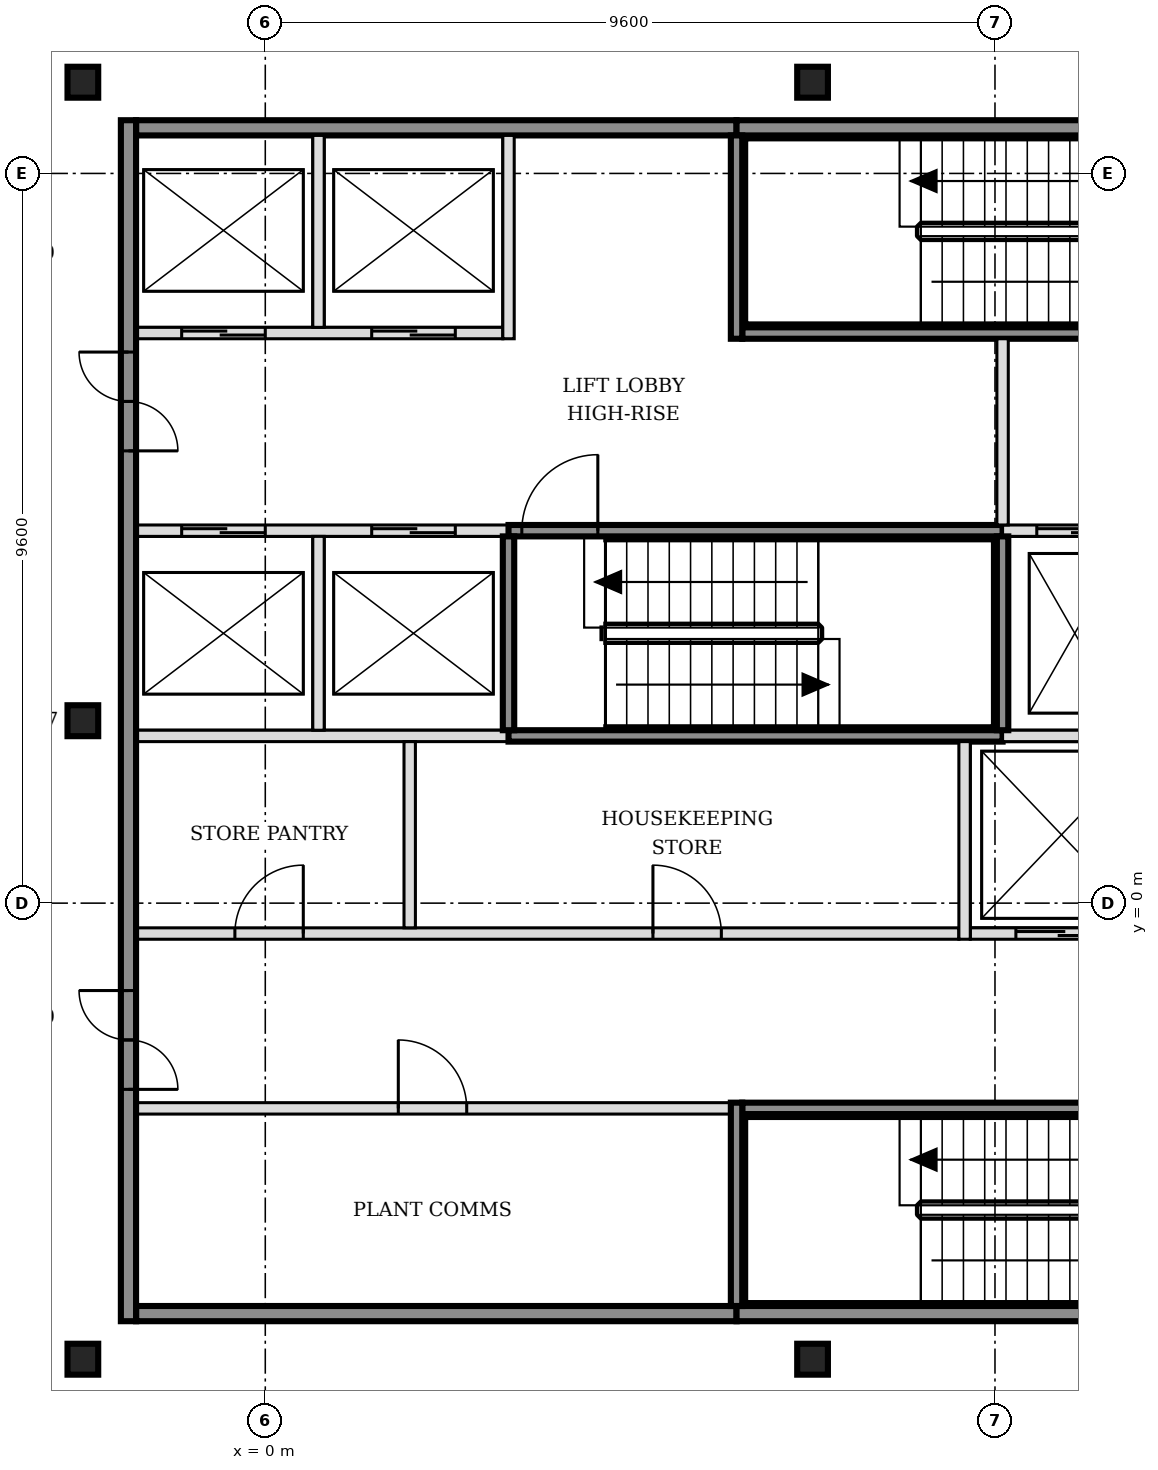
"""IFC4 building model, lengths in metres.
Left out: names, types, materials, properties, quantities, classifications, styles, units other than length and angle.
Written with IfcOpenShell. Run it as: python <this file> out.ifc"""

import sys

from ifc_helpers import new_model, si_unit, direction, frame, frame_2d, origin, origin_2d, place, context, subcontext, project, spatial, rectangle, i_section, extrude, element, fill, save


model = new_model("IFC4")
c1 = context("Model", 3, precision=1e-05, world=origin(), true_north=direction((0.0, 1.0)))
c2 = subcontext(c1, "Body", "Model", "MODEL_VIEW")
j1 = project(units=[si_unit("LENGTHUNIT", "METRE"), si_unit("PLANEANGLEUNIT", "RADIAN")], contexts=[c1])
p1 = place(None, origin())
s1 = spatial("IfcSite", under=j1, at=p1, CompositionType="ELEMENT")
p2 = place(p1, origin())
s2 = spatial("IfcBuilding", under=s1, at=p2, CompositionType="ELEMENT")
p3 = place(p2, frame((0.0, 0.0, 197.4)))
s3 = spatial("IfcBuildingStorey", under=s2, at=p3, CompositionType="ELEMENT", Elevation=197.4)
for number, where, z_axis, x_axis in (
    (1, (-2.4, -6.0, -0.15), (0.0, 0.0, 1.0), (1.0, 0.0, 0.0)),
    (2, (7.2, -6.0, -0.15), (0.0, 0.0, 1.0), (1.0, 0.0, 0.0)),
    (3, (-2.4, 2.4, -0.15), (0.0, 0.0, 1.0), (1.0, 0.0, 0.0)),
    (4, (-2.4, 10.8, -0.15), (0.0, 0.0, 1.0), (1.0, 0.0, 0.0)),
    (5, (7.2, 10.8, -0.15), (0.0, 0.0, 1.0), (1.0, 0.0, 0.0)),
):
    element("IfcColumn", number, at=place(p3, frame(where, z_axis=z_axis, x_axis=x_axis)), inside=s3, PredefinedType="COLUMN", context=c2, shape_type="SweptSolid", body=[
        extrude(i_section(OverallWidth=0.404, OverallDepth=0.407, WebThickness=0.027, FlangeThickness=0.044, FilletRadius=0.015, at=origin_2d()), origin(), (0.0, 0.0, 1.0), 3.6),
    ])
p4 = place(p3, frame((-1.7, -5.4, 0.0), z_axis=(0.0, 0.0, 1.0), x_axis=(1.0, 0.0, 0.0)))
e6 = element("IfcWall", 6, at=p4, inside=s3, PredefinedType="SOLIDWALL", context=c2, shape_type="SweptSolid", body=[
    extrude(rectangle(XDim=7.9, YDim=0.2, at=frame_2d((3.95, 0.0))), origin(), (0.0, 0.0, 1.0), 3.45),
])
p5 = place(p3, frame((6.2, -5.4, 0.0), z_axis=(0.0, 0.0, 1.0), x_axis=(1.0, 0.0, 0.0)))
e7 = element("IfcWall", 7, at=p5, inside=s3, PredefinedType="SOLIDWALL", context=c2, shape_type="SweptSolid", body=[
    extrude(rectangle(XDim=6.5, YDim=0.2, at=frame_2d((3.25, 0.0))), origin(), (0.0, 0.0, 1.0), 3.45),
])
p6 = place(p3, frame((-1.7, -2.7, 0.0), z_axis=(0.0, 0.0, 1.0), x_axis=(1.0, 0.0, 0.0)))
e8 = element("IfcWall", 8, at=p6, inside=s3, PredefinedType="PARTITIONING", context=c2, shape_type="SweptSolid", body=[
    extrude(rectangle(XDim=7.825, YDim=0.15, at=frame_2d((3.913, 0.0))), origin(), (0.0, 0.0, 1.0), 3.45),
])
p7 = place(p6, frame((3.45, 0.0, 0.0)))
e9 = element("IfcOpeningElement", 9, at=p7, cuts=e8, PredefinedType="OPENING", context=c2, shape_type="SweptSolid", body=[
    extrude(rectangle(XDim=0.9, YDim=2.1, at=frame_2d((0.45, 1.05))), frame((0.0, 0.085, 0.0), z_axis=(0.0, -1.0, 0.0), x_axis=(1.0, 0.0, 0.0)), (0.0, 0.0, 1.0), 0.17),
])
p8 = place(p3, frame((6.275, -2.7, 0.0), z_axis=(0.0, 0.0, 1.0), x_axis=(1.0, 0.0, 0.0)))
e10 = element("IfcWall", 10, at=p8, inside=s3, PredefinedType="SOLIDWALL", context=c2, shape_type="SweptSolid", body=[
    extrude(rectangle(XDim=6.35, YDim=0.15, at=frame_2d((3.175, 0.0))), origin(), (0.0, 0.0, 1.0), 3.45),
])
p9 = place(p8, frame((5.225, 0.0, 0.0)))
e11 = element("IfcOpeningElement", 11, at=p9, cuts=e10, PredefinedType="OPENING", context=c2, shape_type="SweptSolid", body=[
    extrude(rectangle(XDim=1.0, YDim=2.1, at=frame_2d((0.5, 1.05))), frame((0.0, 0.085, 0.0), z_axis=(0.0, -1.0, 0.0), x_axis=(1.0, 0.0, 0.0)), (0.0, 0.0, 1.0), 0.17),
])
p10 = place(p3, frame((-1.7, -0.4, 0.0), z_axis=(0.0, 0.0, 1.0), x_axis=(1.0, 0.0, 0.0)))
e12 = element("IfcWall", 12, at=p10, inside=s3, PredefinedType="PARTITIONING", context=c2, shape_type="SweptSolid", body=[
    extrude(rectangle(XDim=10.825, YDim=0.15, at=frame_2d((5.413, 0.0))), origin(), (0.0, 0.0, 1.0), 3.45),
])
p11 = place(p10, frame((1.3, 0.0, 0.0)))
e13 = element("IfcOpeningElement", 13, at=p11, cuts=e12, PredefinedType="OPENING", context=c2, shape_type="SweptSolid", body=[
    extrude(rectangle(XDim=0.9, YDim=2.1, at=frame_2d((0.45, 1.05))), frame((0.0, 0.085, 0.0), z_axis=(0.0, -1.0, 0.0), x_axis=(1.0, 0.0, 0.0)), (0.0, 0.0, 1.0), 0.17),
])
p12 = place(p10, frame((6.8, 0.0, 0.0)))
e14 = element("IfcOpeningElement", 14, at=p12, cuts=e12, PredefinedType="OPENING", context=c2, shape_type="SweptSolid", body=[
    extrude(rectangle(XDim=0.9, YDim=2.1, at=frame_2d((0.45, 1.05))), frame((0.0, 0.085, 0.0), z_axis=(0.0, -1.0, 0.0), x_axis=(1.0, 0.0, 0.0)), (0.0, 0.0, 1.0), 0.17),
])
p13 = place(p3, frame((9.275, -0.4, 0.0), z_axis=(0.0, 0.0, 1.0), x_axis=(1.0, 0.0, 0.0)))
e15 = element("IfcWall", 15, at=p13, inside=s3, PredefinedType="SOLIDWALL", context=c2, shape_type="SweptSolid", body=[
    extrude(rectangle(XDim=4.95, YDim=0.15, at=frame_2d((2.475, 0.0))), origin(), (0.0, 0.0, 1.0), 3.45),
])
p14 = place(p13, frame((0.6, 0.0, 0.0)))
e16 = element("IfcOpeningElement", 16, at=p14, cuts=e15, PredefinedType="OPENING", context=c2, shape_type="SweptSolid", body=[
    extrude(rectangle(XDim=1.2, YDim=2.1, at=frame_2d((0.6, 1.05))), frame((0.0, 0.085, 0.0), z_axis=(0.0, -1.0, 0.0), x_axis=(1.0, 0.0, 0.0)), (0.0, 0.0, 1.0), 0.17),
])
p15 = place(p13, frame((3.15, 0.0, 0.0)))
e17 = element("IfcOpeningElement", 17, at=p15, cuts=e15, PredefinedType="OPENING", context=c2, shape_type="SweptSolid", body=[
    extrude(rectangle(XDim=1.2, YDim=2.1, at=frame_2d((0.6, 1.05))), frame((0.0, 0.085, 0.0), z_axis=(0.0, -1.0, 0.0), x_axis=(1.0, 0.0, 0.0)), (0.0, 0.0, 1.0), 0.17),
])
p16 = place(p3, frame((-1.7, 2.2, 0.0), z_axis=(0.0, 0.0, 1.0), x_axis=(1.0, 0.0, 0.0)))
e18 = element("IfcWall", 18, at=p16, inside=s3, PredefinedType="SOLIDWALL", context=c2, shape_type="SweptSolid", body=[
    extrude(rectangle(XDim=4.9, YDim=0.15, at=frame_2d((2.45, 0.0))), origin(), (0.0, 0.0, 1.0), 3.45),
])
p17 = place(p3, frame((3.2, 2.2, 0.0), z_axis=(0.0, 0.0, 1.0), x_axis=(1.0, 0.0, 0.0)))
e19 = element("IfcWall", 19, at=p17, inside=s3, PredefinedType="SOLIDWALL", context=c2, shape_type="SweptSolid", body=[
    extrude(rectangle(XDim=6.5, YDim=0.15, at=frame_2d((3.25, 0.0))), origin(), (0.0, 0.0, 1.0), 3.45),
])
p18 = place(p3, frame((9.7, 2.2, 0.0), z_axis=(0.0, 0.0, 1.0), x_axis=(1.0, 0.0, 0.0)))
e20 = element("IfcWall", 20, at=p18, inside=s3, PredefinedType="SOLIDWALL", context=c2, shape_type="SweptSolid", body=[
    extrude(rectangle(XDim=4.525, YDim=0.15, at=frame_2d((2.263, 0.0))), origin(), (0.0, 0.0, 1.0), 3.45),
])
p19 = place(p3, frame((-1.7, 4.9, 0.0), z_axis=(0.0, 0.0, 1.0), x_axis=(1.0, 0.0, 0.0)))
e21 = element("IfcWall", 21, at=p19, inside=s3, PredefinedType="SOLIDWALL", context=c2, shape_type="SweptSolid", body=[
    extrude(rectangle(XDim=4.9, YDim=0.15, at=frame_2d((2.45, 0.0))), origin(), (0.0, 0.0, 1.0), 3.45),
])
p20 = place(p19, frame((0.6, 0.0, 0.0)))
e22 = element("IfcOpeningElement", 22, at=p20, cuts=e21, PredefinedType="OPENING", context=c2, shape_type="SweptSolid", body=[
    extrude(rectangle(XDim=1.1, YDim=2.1, at=frame_2d((0.55, 1.05))), frame((0.0, 0.085, 0.0), z_axis=(0.0, -1.0, 0.0), x_axis=(1.0, 0.0, 0.0)), (0.0, 0.0, 1.0), 0.17),
])
p21 = place(p19, frame((3.1, 0.0, 0.0)))
e23 = element("IfcOpeningElement", 23, at=p21, cuts=e21, PredefinedType="OPENING", context=c2, shape_type="SweptSolid", body=[
    extrude(rectangle(XDim=1.1, YDim=2.1, at=frame_2d((0.55, 1.05))), frame((0.0, 0.085, 0.0), z_axis=(0.0, -1.0, 0.0), x_axis=(1.0, 0.0, 0.0)), (0.0, 0.0, 1.0), 0.17),
])
p22 = place(p3, frame((3.2, 4.9, 0.0), z_axis=(0.0, 0.0, 1.0), x_axis=(1.0, 0.0, 0.0)))
e24 = element("IfcWall", 24, at=p22, inside=s3, PredefinedType="SOLIDWALL", context=c2, shape_type="SweptSolid", body=[
    extrude(rectangle(XDim=6.5, YDim=0.15, at=frame_2d((3.25, 0.0))), origin(), (0.0, 0.0, 1.0), 3.45),
])
p23 = place(p22, frame((0.175, 0.0, 0.0)))
e25 = element("IfcOpeningElement", 25, at=p23, cuts=e24, PredefinedType="OPENING", context=c2, shape_type="SweptSolid", body=[
    extrude(rectangle(XDim=1.0, YDim=2.1, at=frame_2d((0.5, 1.05))), frame((0.0, 0.085, 0.0), z_axis=(0.0, -1.0, 0.0), x_axis=(1.0, 0.0, 0.0)), (0.0, 0.0, 1.0), 0.17),
])
p24 = place(p3, frame((9.7, 4.9, 0.0), z_axis=(0.0, 0.0, 1.0), x_axis=(1.0, 0.0, 0.0)))
e26 = element("IfcWall", 26, at=p24, inside=s3, PredefinedType="SOLIDWALL", context=c2, shape_type="SweptSolid", body=[
    extrude(rectangle(XDim=6.4, YDim=0.15, at=frame_2d((3.2, 0.0))), origin(), (0.0, 0.0, 1.0), 3.45),
])
p25 = place(p24, frame((0.45, 0.0, 0.0)))
e27 = element("IfcOpeningElement", 27, at=p25, cuts=e26, PredefinedType="OPENING", context=c2, shape_type="SweptSolid", body=[
    extrude(rectangle(XDim=1.0, YDim=2.1, at=frame_2d((0.5, 1.05))), frame((0.0, 0.085, 0.0), z_axis=(0.0, -1.0, 0.0), x_axis=(1.0, 0.0, 0.0)), (0.0, 0.0, 1.0), 0.17),
])
p26 = place(p24, frame((2.35, 0.0, 0.0)))
e28 = element("IfcOpeningElement", 28, at=p26, cuts=e26, PredefinedType="OPENING", context=c2, shape_type="SweptSolid", body=[
    extrude(rectangle(XDim=1.0, YDim=2.1, at=frame_2d((0.5, 1.05))), frame((0.0, 0.085, 0.0), z_axis=(0.0, -1.0, 0.0), x_axis=(1.0, 0.0, 0.0)), (0.0, 0.0, 1.0), 0.17),
])
p27 = place(p24, frame((4.7, 0.0, 0.0)))
e29 = element("IfcOpeningElement", 29, at=p27, cuts=e26, PredefinedType="OPENING", context=c2, shape_type="SweptSolid", body=[
    extrude(rectangle(XDim=0.9, YDim=2.1, at=frame_2d((0.45, 1.05))), frame((0.0, 0.085, 0.0), z_axis=(0.0, -1.0, 0.0), x_axis=(1.0, 0.0, 0.0)), (0.0, 0.0, 1.0), 0.17),
])
p28 = place(p3, frame((-1.7, 7.5, 0.0), z_axis=(0.0, 0.0, 1.0), x_axis=(1.0, 0.0, 0.0)))
e30 = element("IfcWall", 30, at=p28, inside=s3, PredefinedType="SOLIDWALL", context=c2, shape_type="SweptSolid", body=[
    extrude(rectangle(XDim=4.825, YDim=0.15, at=frame_2d((2.413, 0.0))), origin(), (0.0, 0.0, 1.0), 3.45),
])
p29 = place(p28, frame((0.6, 0.0, 0.0)))
e31 = element("IfcOpeningElement", 31, at=p29, cuts=e30, PredefinedType="OPENING", context=c2, shape_type="SweptSolid", body=[
    extrude(rectangle(XDim=1.1, YDim=2.1, at=frame_2d((0.55, 1.05))), frame((0.0, 0.085, 0.0), z_axis=(0.0, -1.0, 0.0), x_axis=(1.0, 0.0, 0.0)), (0.0, 0.0, 1.0), 0.17),
])
p30 = place(p28, frame((3.1, 0.0, 0.0)))
e32 = element("IfcOpeningElement", 32, at=p30, cuts=e30, PredefinedType="OPENING", context=c2, shape_type="SweptSolid", body=[
    extrude(rectangle(XDim=1.1, YDim=2.1, at=frame_2d((0.55, 1.05))), frame((0.0, 0.085, 0.0), z_axis=(0.0, -1.0, 0.0), x_axis=(1.0, 0.0, 0.0)), (0.0, 0.0, 1.0), 0.17),
])
p31 = place(p3, frame((6.275, 7.5, 0.0), z_axis=(0.0, 0.0, 1.0), x_axis=(1.0, 0.0, 0.0)))
e33 = element("IfcWall", 33, at=p31, inside=s3, PredefinedType="SOLIDWALL", context=c2, shape_type="SweptSolid", body=[
    extrude(rectangle(XDim=6.425, YDim=0.15, at=frame_2d((3.212, 0.0))), origin(), (0.0, 0.0, 1.0), 3.45),
])
p32 = place(p31, frame((5.225, 0.0, 0.0)))
e34 = element("IfcOpeningElement", 34, at=p32, cuts=e33, PredefinedType="OPENING", context=c2, shape_type="SweptSolid", body=[
    extrude(rectangle(XDim=1.0, YDim=2.1, at=frame_2d((0.5, 1.05))), frame((0.0, 0.085, 0.0), z_axis=(0.0, -1.0, 0.0), x_axis=(1.0, 0.0, 0.0)), (0.0, 0.0, 1.0), 0.17),
])
p33 = place(p3, frame((-1.7, 10.2, 0.0), z_axis=(0.0, 0.0, 1.0), x_axis=(1.0, 0.0, 0.0)))
e35 = element("IfcWall", 35, at=p33, inside=s3, PredefinedType="SOLIDWALL", context=c2, shape_type="SweptSolid", body=[
    extrude(rectangle(XDim=7.9, YDim=0.2, at=frame_2d((3.95, 0.0))), origin(), (0.0, 0.0, 1.0), 3.45),
])
p34 = place(p3, frame((6.2, 10.2, 0.0), z_axis=(0.0, 0.0, 1.0), x_axis=(1.0, 0.0, 0.0)))
e36 = element("IfcWall", 36, at=p34, inside=s3, PredefinedType="SOLIDWALL", context=c2, shape_type="SweptSolid", body=[
    extrude(rectangle(XDim=6.5, YDim=0.2, at=frame_2d((3.25, 0.0))), origin(), (0.0, 0.0, 1.0), 3.45),
])
p35 = place(p3, frame((-1.8, -5.5, 0.0), z_axis=(0.0, 0.0, 1.0), x_axis=(0.0, 1.0, 0.0)))
e37 = element("IfcWall", 37, at=p35, inside=s3, PredefinedType="SOLIDWALL", context=c2, shape_type="SweptSolid", body=[
    extrude(rectangle(XDim=15.8, YDim=0.2, at=frame_2d((7.9, 0.0))), origin(), (0.0, 0.0, 1.0), 3.45),
])
p36 = place(p35, frame((3.05, 0.0, 0.0)))
e38 = element("IfcOpeningElement", 38, at=p36, cuts=e37, PredefinedType="OPENING", context=c2, shape_type="SweptSolid", body=[
    extrude(rectangle(XDim=1.3, YDim=2.1, at=frame_2d((0.65, 1.05))), frame((0.0, 0.11, 0.0), z_axis=(0.0, -1.0, 0.0), x_axis=(1.0, 0.0, 0.0)), (0.0, 0.0, 1.0), 0.22),
])
p37 = place(p35, frame((11.45, 0.0, 0.0)))
e39 = element("IfcOpeningElement", 39, at=p37, cuts=e37, PredefinedType="OPENING", context=c2, shape_type="SweptSolid", body=[
    extrude(rectangle(XDim=1.3, YDim=2.1, at=frame_2d((0.65, 1.05))), frame((0.0, 0.11, 0.0), z_axis=(0.0, -1.0, 0.0), x_axis=(1.0, 0.0, 0.0)), (0.0, 0.0, 1.0), 0.22),
])
p38 = place(p3, frame((0.7, 2.275, 0.0), z_axis=(0.0, 0.0, 1.0), x_axis=(0.0, 1.0, 0.0)))
e40 = element("IfcWall", 40, at=p38, inside=s3, PredefinedType="SOLIDWALL", context=c2, shape_type="SweptSolid", body=[
    extrude(rectangle(XDim=2.55, YDim=0.15, at=frame_2d((1.275, 0.0))), origin(), (0.0, 0.0, 1.0), 3.45),
])
p39 = place(p3, frame((0.7, 7.575, 0.0), z_axis=(0.0, 0.0, 1.0), x_axis=(0.0, 1.0, 0.0)))
e41 = element("IfcWall", 41, at=p39, inside=s3, PredefinedType="SOLIDWALL", context=c2, shape_type="SweptSolid", body=[
    extrude(rectangle(XDim=2.525, YDim=0.15, at=frame_2d((1.263, 0.0))), origin(), (0.0, 0.0, 1.0), 3.45),
])
p40 = place(p3, frame((1.9, -0.325, 0.0), z_axis=(0.0, 0.0, 1.0), x_axis=(0.0, 1.0, 0.0)))
e42 = element("IfcWall", 42, at=p40, inside=s3, PredefinedType="PARTITIONING", context=c2, shape_type="SweptSolid", body=[
    extrude(rectangle(XDim=2.45, YDim=0.15, at=frame_2d((1.225, 0.0))), origin(), (0.0, 0.0, 1.0), 3.45),
])
p41 = place(p3, frame((3.2, 2.275, 0.0), z_axis=(0.0, 0.0, 1.0), x_axis=(0.0, 1.0, 0.0)))
e43 = element("IfcWall", 43, at=p41, inside=s3, PredefinedType="SOLIDWALL", context=c2, shape_type="SweptSolid", body=[
    extrude(rectangle(XDim=2.55, YDim=0.15, at=frame_2d((1.275, 0.0))), origin(), (0.0, 0.0, 1.0), 3.45),
])
for number, where, z_axis, x_axis in (
    (44, (3.2, 7.425, 0.0), (0.0, 0.0, 1.0), (0.0, 1.0, 0.0)),
    (45, (6.2, -5.3, 0.0), (0.0, 0.0, 1.0), (0.0, 1.0, 0.0)),
    (46, (6.2, 7.425, 0.0), (0.0, 0.0, 1.0), (0.0, 1.0, 0.0)),
):
    element("IfcWall", number, at=place(p3, frame(where, z_axis=z_axis, x_axis=x_axis)), inside=s3, PredefinedType="SOLIDWALL", context=c2, shape_type="SweptSolid", body=[
        extrude(rectangle(XDim=2.675, YDim=0.15, at=frame_2d((1.337, 0.0))), origin(), (0.0, 0.0, 1.0), 3.45),
    ])
p42 = place(p3, frame((9.2, -0.475, 0.0), z_axis=(0.0, 0.0, 1.0), x_axis=(0.0, 1.0, 0.0)))
e47 = element("IfcWall", 47, at=p42, inside=s3, PredefinedType="SOLIDWALL", context=c2, shape_type="SweptSolid", body=[
    extrude(rectangle(XDim=2.6, YDim=0.15, at=frame_2d((1.3, 0.0))), origin(), (0.0, 0.0, 1.0), 3.45),
])
p43 = place(p3, frame((9.7, 2.275, 0.0), z_axis=(0.0, 0.0, 1.0), x_axis=(0.0, 1.0, 0.0)))
e48 = element("IfcWall", 48, at=p43, inside=s3, PredefinedType="SOLIDWALL", context=c2, shape_type="SweptSolid", body=[
    extrude(rectangle(XDim=2.55, YDim=0.15, at=frame_2d((1.275, 0.0))), origin(), (0.0, 0.0, 1.0), 3.45),
])
p44 = place(p3, frame((9.7, 4.975, 0.0), z_axis=(0.0, 0.0, 1.0), x_axis=(0.0, 1.0, 0.0)))
e49 = element("IfcWall", 49, at=p44, inside=s3, PredefinedType="SOLIDWALL", context=c2, shape_type="SweptSolid", body=[
    extrude(rectangle(XDim=2.45, YDim=0.15, at=frame_2d((1.225, 0.0))), origin(), (0.0, 0.0, 1.0), 3.45),
])
p45 = place(p14, origin())
e50 = element("IfcDoor", 50, at=p45, inside=s3, OperationType="DOUBLE_DOOR_SLIDING", PredefinedType="DOOR", context=c2, shape_type="SweptSolid", body=[
    extrude(rectangle(XDim=1.2, YDim=2.1, at=frame_2d((0.6, 1.05))), frame((0.0, 0.025, 0.0), z_axis=(0.0, -1.0, 0.0), x_axis=(1.0, 0.0, 0.0)), (0.0, 0.0, 1.0), 0.05),
])
fill(e16, e50)
p46 = place(p20, origin())
e51 = element("IfcDoor", 51, at=p46, inside=s3, OperationType="DOUBLE_DOOR_SLIDING", PredefinedType="DOOR", context=c2, shape_type="SweptSolid", body=[
    extrude(rectangle(XDim=1.1, YDim=2.1, at=frame_2d((0.55, 1.05))), frame((0.0, 0.025, 0.0), z_axis=(0.0, -1.0, 0.0), x_axis=(1.0, 0.0, 0.0)), (0.0, 0.0, 1.0), 0.05),
])
fill(e22, e51)
p47 = place(p21, origin())
e52 = element("IfcDoor", 52, at=p47, inside=s3, OperationType="DOUBLE_DOOR_SLIDING", PredefinedType="DOOR", context=c2, shape_type="SweptSolid", body=[
    extrude(rectangle(XDim=1.1, YDim=2.1, at=frame_2d((0.55, 1.05))), frame((0.0, 0.025, 0.0), z_axis=(0.0, -1.0, 0.0), x_axis=(1.0, 0.0, 0.0)), (0.0, 0.0, 1.0), 0.05),
])
fill(e23, e52)
p48 = place(p29, origin())
e53 = element("IfcDoor", 53, at=p48, inside=s3, OperationType="DOUBLE_DOOR_SLIDING", PredefinedType="DOOR", context=c2, shape_type="SweptSolid", body=[
    extrude(rectangle(XDim=1.1, YDim=2.1, at=frame_2d((0.55, 1.05))), frame((0.0, 0.025, 0.0), z_axis=(0.0, -1.0, 0.0), x_axis=(1.0, 0.0, 0.0)), (0.0, 0.0, 1.0), 0.05),
])
fill(e31, e53)
p49 = place(p30, origin())
e54 = element("IfcDoor", 54, at=p49, inside=s3, OperationType="DOUBLE_DOOR_SLIDING", PredefinedType="DOOR", context=c2, shape_type="SweptSolid", body=[
    extrude(rectangle(XDim=1.1, YDim=2.1, at=frame_2d((0.55, 1.05))), frame((0.0, 0.025, 0.0), z_axis=(0.0, -1.0, 0.0), x_axis=(1.0, 0.0, 0.0)), (0.0, 0.0, 1.0), 0.05),
])
fill(e32, e54)
p50 = place(p25, origin())
e55 = element("IfcDoor", 55, at=p50, inside=s3, OperationType="DOUBLE_DOOR_SLIDING", PredefinedType="DOOR", context=c2, shape_type="SweptSolid", body=[
    extrude(rectangle(XDim=1.0, YDim=2.1, at=frame_2d((0.5, 1.05))), frame((0.0, 0.025, 0.0), z_axis=(0.0, -1.0, 0.0), x_axis=(1.0, 0.0, 0.0)), (0.0, 0.0, 1.0), 0.05),
])
fill(e27, e55)
p51 = place(p23, origin())
e56 = element("IfcDoor", 56, at=p51, inside=s3, OperationType="SINGLE_SWING_RIGHT", PredefinedType="DOOR", context=c2, shape_type="SweptSolid", body=[
    extrude(rectangle(XDim=1.0, YDim=2.1, at=frame_2d((0.5, 1.05))), frame((0.0, 0.025, 0.0), z_axis=(0.0, -1.0, 0.0), x_axis=(1.0, 0.0, 0.0)), (0.0, 0.0, 1.0), 0.05),
])
fill(e25, e56)
p52 = place(p36, origin())
e57 = element("IfcDoor", 57, at=p52, inside=s3, OperationType="DOUBLE_DOOR_SINGLE_SWING", PredefinedType="DOOR", context=c2, shape_type="SweptSolid", body=[
    extrude(rectangle(XDim=1.3, YDim=2.1, at=frame_2d((0.65, 1.05))), frame((0.0, 0.025, 0.0), z_axis=(0.0, -1.0, 0.0), x_axis=(1.0, 0.0, 0.0)), (0.0, 0.0, 1.0), 0.05),
])
fill(e38, e57)
p53 = place(p37, origin())
e58 = element("IfcDoor", 58, at=p53, inside=s3, OperationType="DOUBLE_DOOR_SINGLE_SWING", PredefinedType="DOOR", context=c2, shape_type="SweptSolid", body=[
    extrude(rectangle(XDim=1.3, YDim=2.1, at=frame_2d((0.65, 1.05))), frame((0.0, 0.025, 0.0), z_axis=(0.0, -1.0, 0.0), x_axis=(1.0, 0.0, 0.0)), (0.0, 0.0, 1.0), 0.05),
])
fill(e39, e58)
p54 = place(p7, origin())
e59 = element("IfcDoor", 59, at=p54, inside=s3, OperationType="SINGLE_SWING_LEFT", PredefinedType="DOOR", context=c2, shape_type="SweptSolid", body=[
    extrude(rectangle(XDim=0.9, YDim=2.1, at=frame_2d((0.45, 1.05))), frame((0.0, 0.025, 0.0), z_axis=(0.0, -1.0, 0.0), x_axis=(1.0, 0.0, 0.0)), (0.0, 0.0, 1.0), 0.05),
])
fill(e9, e59)
p55 = place(p11, origin())
e60 = element("IfcDoor", 60, at=p55, inside=s3, OperationType="SINGLE_SWING_RIGHT", PredefinedType="DOOR", context=c2, shape_type="SweptSolid", body=[
    extrude(rectangle(XDim=0.9, YDim=2.1, at=frame_2d((0.45, 1.05))), frame((0.0, 0.025, 0.0), z_axis=(0.0, -1.0, 0.0), x_axis=(1.0, 0.0, 0.0)), (0.0, 0.0, 1.0), 0.05),
])
fill(e13, e60)
p56 = place(p12, origin())
e61 = element("IfcDoor", 61, at=p56, inside=s3, OperationType="SINGLE_SWING_LEFT", PredefinedType="DOOR", context=c2, shape_type="SweptSolid", body=[
    extrude(rectangle(XDim=0.9, YDim=2.1, at=frame_2d((0.45, 1.05))), frame((0.0, 0.025, 0.0), z_axis=(0.0, -1.0, 0.0), x_axis=(1.0, 0.0, 0.0)), (0.0, 0.0, 1.0), 0.05),
])
fill(e14, e61)
save(model, sys.argv[1])
